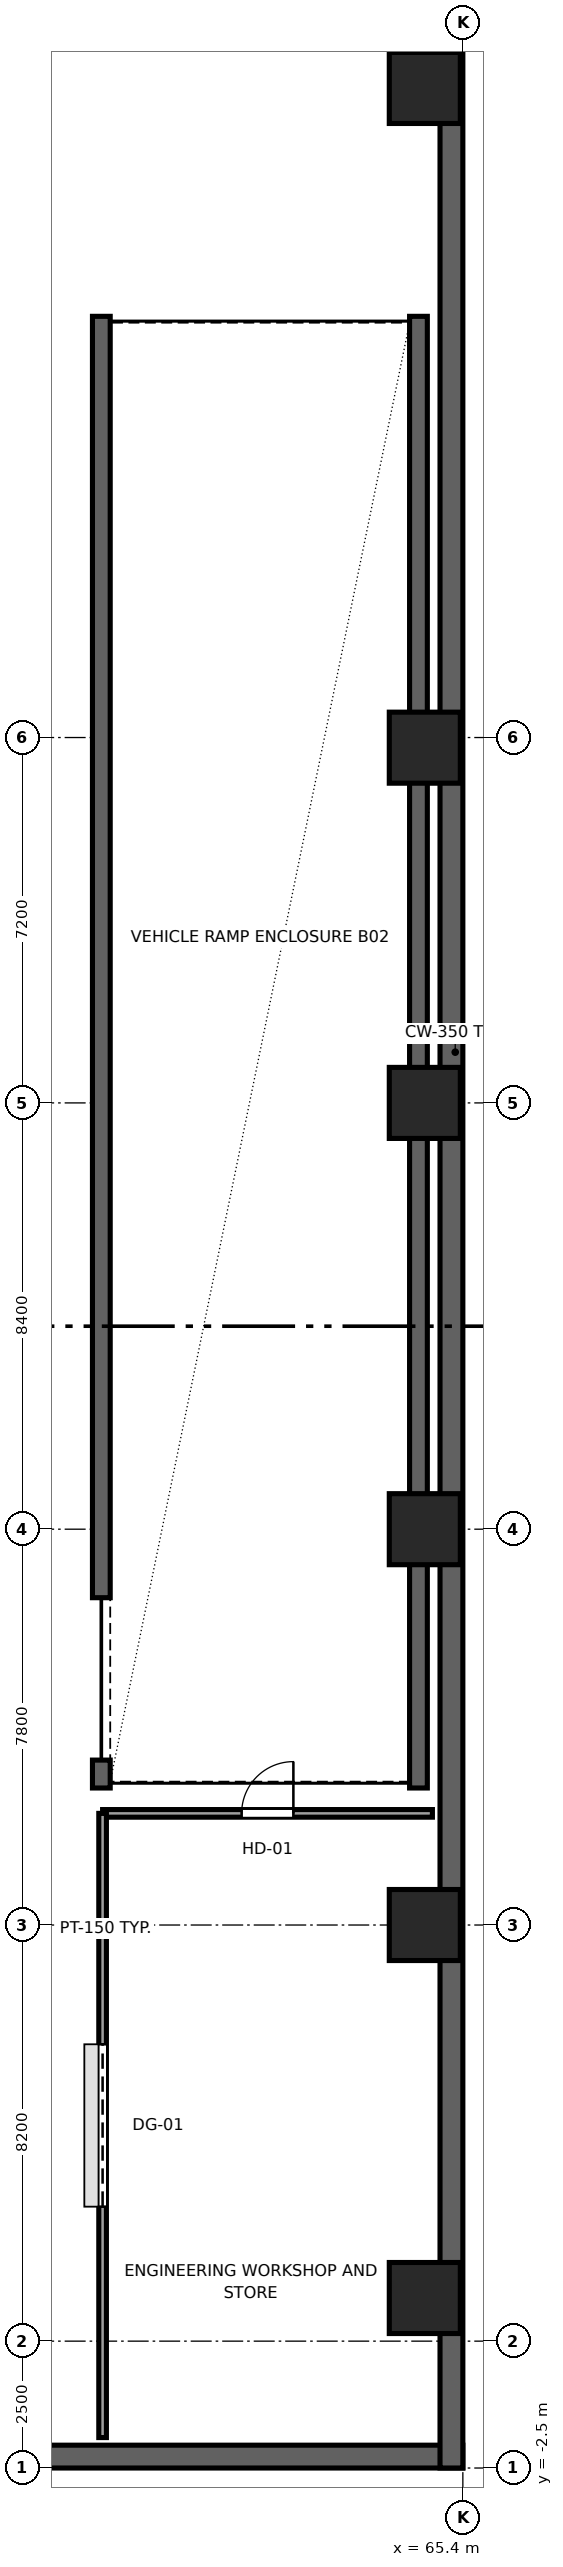
"""IFC4 building model, lengths in metres.
Left out: names, types, materials, properties, quantities, classifications, styles, units other than length and angle.
Written with IfcOpenShell. Run it as: python <this file> out.ifc"""

import sys

from ifc_helpers import new_model, si_unit, direction, frame, frame_2d, origin, origin_2d, place, context, subcontext, project, spatial, rectangle, extrude, source, transform, mapped, element, fill, save


model = new_model("IFC4")
c1 = context("Model", 3, precision=1e-05, world=origin(), true_north=direction((0.0, 1.0)))
c2 = subcontext(c1, "Body", "Model", "MODEL_VIEW")
j1 = project(units=[si_unit("LENGTHUNIT", "METRE"), si_unit("PLANEANGLEUNIT", "RADIAN")], contexts=[c1])
p1 = place(None, origin())
s1 = spatial("IfcSite", under=j1, at=p1, CompositionType="ELEMENT")
p2 = place(p1, origin())
s2 = spatial("IfcBuilding", under=s1, at=p2, CompositionType="ELEMENT")
p3 = place(p2, frame((0.0, 0.0, -9.6)))
s3 = spatial("IfcBuildingStorey", under=s2, at=p3, CompositionType="ELEMENT", Elevation=-9.6)
p4 = place(p3, frame((58.275, 10.9, 0.0), z_axis=(0.0, 0.0, 1.0), x_axis=(0.0, 1.0, 0.0)))
e1 = element("IfcWall", 1, at=p4, inside=s3, PredefinedType="SHEAR", context=c2, shape_type="SweptSolid", body=[
    extrude(rectangle(XDim=0.55, YDim=0.35, at=frame_2d((0.275, 0.0))), origin(), (0.0, 0.0, 1.0), 4.8),
])
p5 = place(p3, frame((58.275, 14.65, 0.0), z_axis=(0.0, 0.0, 1.0), x_axis=(0.0, 1.0, 0.0)))
e2 = element("IfcWall", 2, at=p5, inside=s3, PredefinedType="SHEAR", context=c2, shape_type="SweptSolid", body=[
    extrude(rectangle(XDim=25.25, YDim=0.35, at=frame_2d((12.625, 0.0))), origin(), (0.0, 0.0, 1.0), 4.8),
])
p6 = place(p3, frame((64.525, 10.9, 0.0), z_axis=(0.0, 0.0, 1.0), x_axis=(0.0, 1.0, 0.0)))
e3 = element("IfcWall", 3, at=p6, inside=s3, PredefinedType="SHEAR", context=c2, shape_type="SweptSolid", body=[
    extrude(rectangle(XDim=29.0, YDim=0.35, at=frame_2d((14.5, 0.0))), origin(), (0.0, 0.0, 1.0), 4.8),
])
p7 = place(p3, frame((-8.4, -2.275, 0.0), z_axis=(0.0, 0.0, 1.0), x_axis=(1.0, 0.0, 0.0)))
e4 = element("IfcWall", 4, at=p7, inside=s3, PredefinedType="SOLIDWALL", context=c2, shape_type="SweptSolid", body=[
    extrude(rectangle(XDim=73.8, YDim=0.45, at=frame_2d((36.9, 0.0))), origin(), (0.0, 0.0, 1.0), 4.8),
])
p8 = place(p3, frame((65.175, -2.5, 0.0), z_axis=(0.0, 0.0, 1.0), x_axis=(0.0, 1.0, 0.0)))
e5 = element("IfcWall", 5, at=p8, inside=s3, PredefinedType="SOLIDWALL", context=c2, shape_type="SweptSolid", body=[
    extrude(rectangle(XDim=51.0, YDim=0.45, at=frame_2d((25.5, 0.0))), origin(), (0.0, 0.0, 1.0), 4.8),
])
m1 = source(origin(), c2, "Body", "SweptSolid", [
    extrude(rectangle(XDim=1.4, YDim=1.4, at=origin_2d()), origin(), (0.0, 0.0, 1.0), 4.8),
])
for number, where, z_axis, x_axis in (
    (6, (64.65, 0.85, 0.0), (0.0, 0.0, 1.0), (1.0, 0.0, 0.0)),
    (7, (64.65, 8.2, 0.0), (0.0, 0.0, 1.0), (1.0, 0.0, 0.0)),
    (8, (64.65, 16.0, 0.0), (0.0, 0.0, 1.0), (1.0, 0.0, 0.0)),
    (9, (64.65, 24.4, 0.0), (0.0, 0.0, 1.0), (1.0, 0.0, 0.0)),
    (10, (64.65, 31.4, 0.0), (0.0, 0.0, 1.0), (1.0, 0.0, 0.0)),
    (11, (64.65, 44.4, 0.0), (0.0, 0.0, 1.0), (1.0, 0.0, 0.0)),
):
    element("IfcColumn", number, at=place(p3, frame(where, z_axis=z_axis, x_axis=x_axis)), inside=s3, PredefinedType="COLUMN", context=c2, shape_type="MappedRepresentation", body=[
        mapped(m1, transform((0.0, 0.0, 0.0), x_axis=(1.0, 0.0, 0.0), y_axis=(0.0, 1.0, 0.0), z_axis=(0.0, 0.0, 1.0), scale=1.0)),
    ])
p9 = place(p3, frame((58.3, 10.4, 0.0), z_axis=(0.0, 0.0, 1.0), x_axis=(1.0, 0.0, 0.0)))
e12 = element("IfcWall", 12, at=p9, inside=s3, PredefinedType="PARTITIONING", context=c2, shape_type="SweptSolid", body=[
    extrude(rectangle(XDim=6.5, YDim=0.15, at=frame_2d((3.25, 0.0))), origin(), (0.0, 0.0, 1.0), 4.54),
])
p10 = place(p9, frame((2.74, 0.0, 0.0)))
e13 = element("IfcOpeningElement", 13, at=p10, cuts=e12, PredefinedType="OPENING", context=c2, shape_type="SweptSolid", body=[
    extrude(rectangle(XDim=1.02, YDim=2.03, at=frame_2d((0.51, 1.015))), frame((0.0, 0.085, 0.0), z_axis=(0.0, -1.0, 0.0), x_axis=(1.0, 0.0, 0.0)), (0.0, 0.0, 1.0), 0.17),
])
p11 = place(p3, frame((58.3, -1.9, 0.0), z_axis=(0.0, 0.0, 1.0), x_axis=(0.0, 1.0, 0.0)))
e14 = element("IfcWall", 14, at=p11, inside=s3, PredefinedType="PARTITIONING", context=c2, shape_type="SweptSolid", body=[
    extrude(rectangle(XDim=12.3, YDim=0.15, at=frame_2d((6.15, 0.0))), origin(), (0.0, 0.0, 1.0), 4.54),
])
p12 = place(p11, frame((4.55, 0.0, 0.0)))
e15 = element("IfcOpeningElement", 15, at=p12, cuts=e14, PredefinedType="OPENING", context=c2, shape_type="SweptSolid", body=[
    extrude(rectangle(XDim=3.2, YDim=2.8, at=frame_2d((1.6, 1.4))), frame((0.0, 0.085, 0.0), z_axis=(0.0, -1.0, 0.0), x_axis=(1.0, 0.0, 0.0)), (0.0, 0.0, 1.0), 0.17),
])
m2 = source(origin(), c2, "Body", "SweptSolid", [
    extrude(rectangle(XDim=1.02, YDim=2.03, at=frame_2d((0.51, 1.015))), frame((0.0, 0.025, 0.0), z_axis=(0.0, -1.0, 0.0), x_axis=(1.0, 0.0, 0.0)), (0.0, 0.0, 1.0), 0.05),
])
p13 = place(p10, origin())
e16 = element("IfcDoor", 16, at=p13, inside=s3, OperationType="SINGLE_SWING_RIGHT", PredefinedType="DOOR", context=c2, shape_type="MappedRepresentation", body=[
    mapped(m2, transform((0.0, 0.0, 0.0), x_axis=(1.0, 0.0, 0.0), y_axis=(0.0, 1.0, 0.0), z_axis=(0.0, 0.0, 1.0), scale=1.0)),
])
fill(e13, e16)
m3 = source(origin(), c2, "Body", "SweptSolid", [
    extrude(rectangle(XDim=3.2, YDim=2.8, at=frame_2d((1.6, 1.4))), frame((0.0, 0.025, 0.0), z_axis=(0.0, -1.0, 0.0), x_axis=(1.0, 0.0, 0.0)), (0.0, 0.0, 1.0), 0.05),
])
p14 = place(p12, origin())
e17 = element("IfcDoor", 17, at=p14, inside=s3, OperationType="ROLLINGUP", PredefinedType="GATE", context=c2, shape_type="MappedRepresentation", body=[
    mapped(m3, transform((0.0, 0.0, 0.0), x_axis=(1.0, 0.0, 0.0), y_axis=(0.0, 1.0, 0.0), z_axis=(0.0, 0.0, 1.0), scale=1.0)),
])
fill(e15, e17)
save(model, sys.argv[1])
